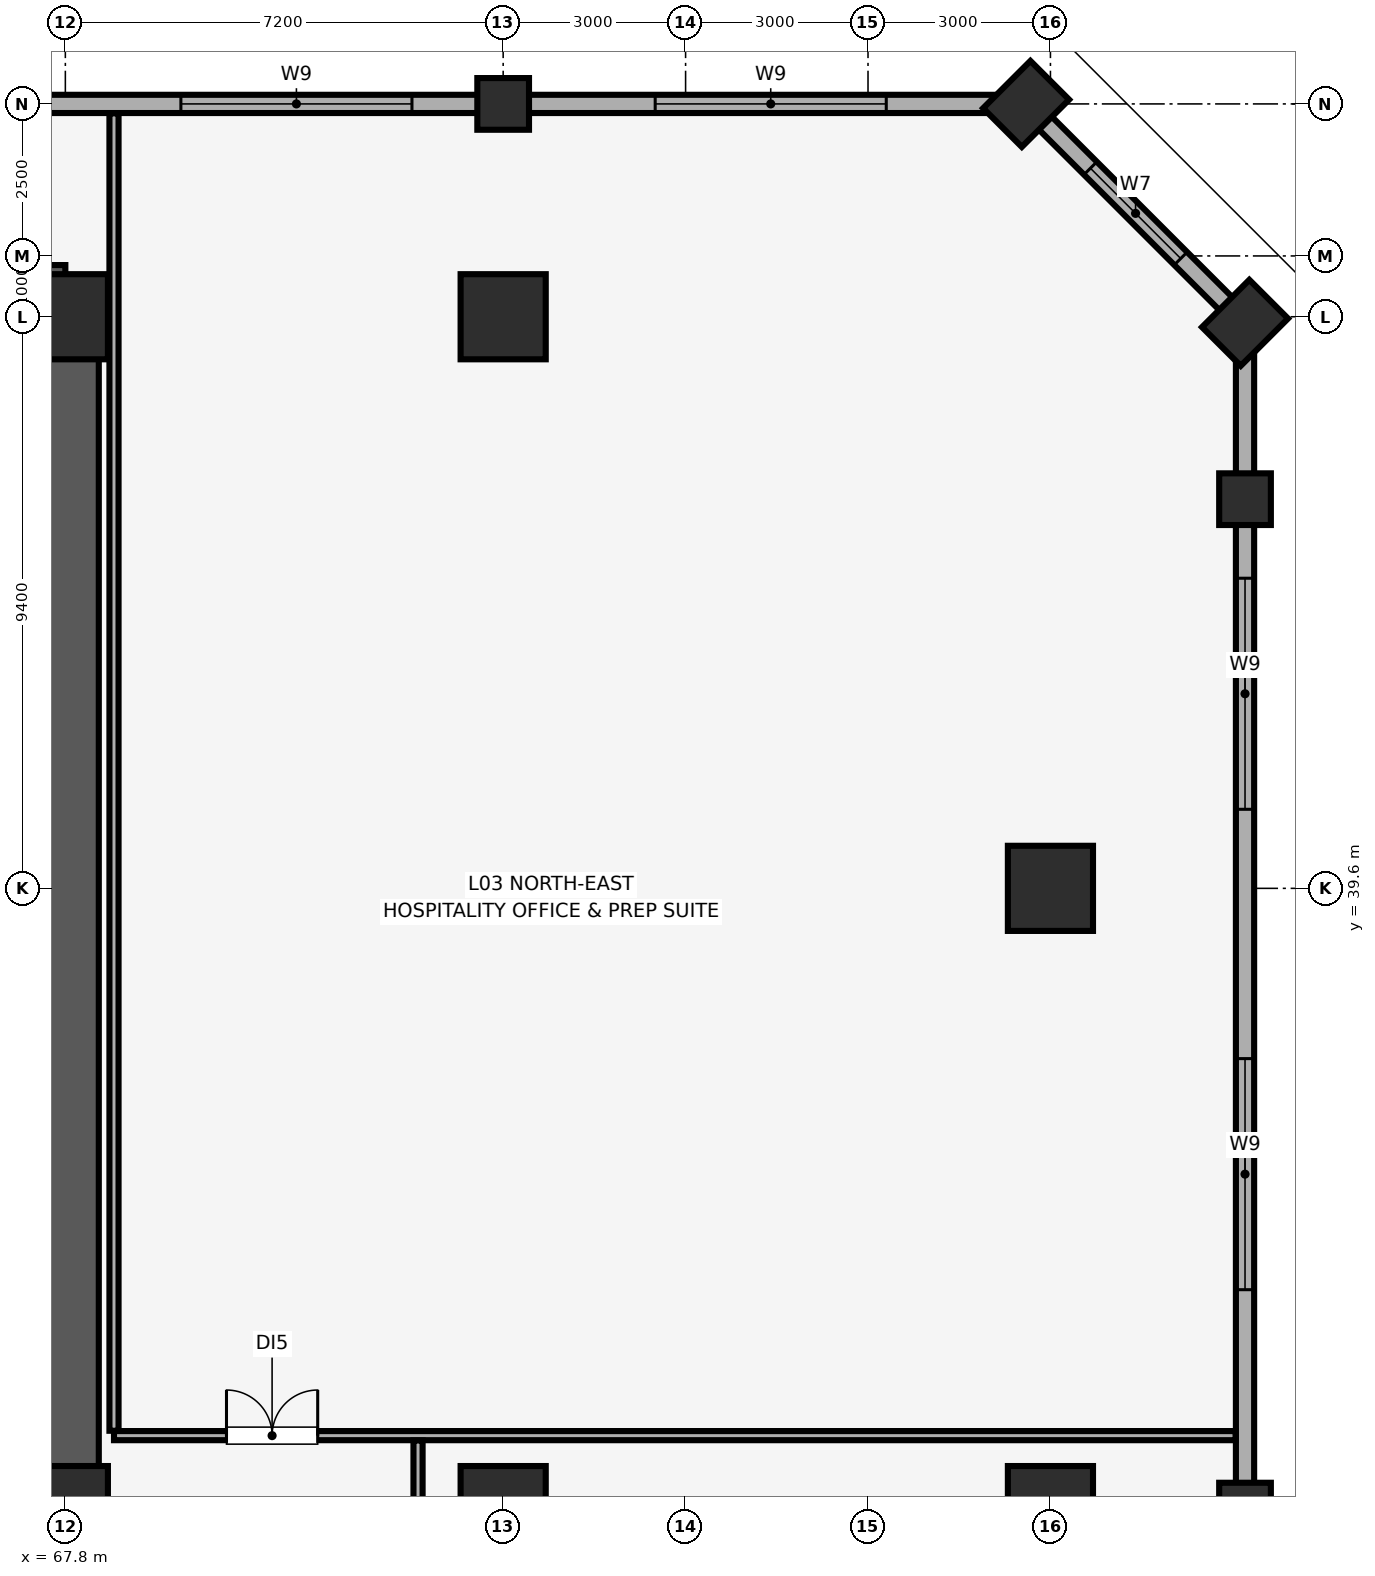
"""IFC4 building model, lengths in metres.
Left out: names, types, materials, properties, quantities, classifications, styles, units other than length and angle.
Written with IfcOpenShell. Run it as: python <this file> out.ifc"""

import sys

from ifc_helpers import new_model, si_unit, direction, frame, frame_2d, origin, origin_2d, place, context, subcontext, project, spatial, rectangle, extrude, element, fill, save


model = new_model("IFC4")
c1 = context("Model", 3, precision=1e-05, world=origin(), true_north=direction((0.0, 1.0)))
c2 = subcontext(c1, "Body", "Model", "MODEL_VIEW")
j1 = project(units=[si_unit("LENGTHUNIT", "METRE"), si_unit("PLANEANGLEUNIT", "RADIAN")], contexts=[c1])
p1 = place(None, origin())
s1 = spatial("IfcSite", under=j1, at=p1, CompositionType="ELEMENT")
p2 = place(p1, origin())
s2 = spatial("IfcBuilding", under=s1, at=p2, CompositionType="ELEMENT")
p3 = place(p2, frame((0.0, 0.0, 19.4)))
s3 = spatial("IfcBuildingStorey", under=s2, at=p3, CompositionType="ELEMENT", Elevation=19.4)
for number, where, z_axis, x_axis in (
    (1, (75.0, 52.5, 0.0), (0.0, 0.0, 1.0), (1.0, 0.0, 0.0)),
    (2, (87.2, 29.4, 0.0), (0.0, 0.0, 1.0), (1.0, 0.0, 0.0)),
    (3, (87.2, 46.0, 0.0), (0.0, 0.0, 1.0), (1.0, 0.0, 0.0)),
):
    element("IfcColumn", number, at=place(p3, frame(where, z_axis=z_axis, x_axis=x_axis)), inside=s3, PredefinedType="COLUMN", context=c2, shape_type="SweptSolid", body=[
        extrude(rectangle(XDim=0.85, YDim=0.85, at=origin_2d()), origin(), (0.0, 0.0, 1.0), 6.28),
    ])
for number, where, z_axis, x_axis in (
    (4, (87.2, 48.9, 0.0), (0.0, 0.0, 1.0), (0.707, 0.707, 0.0)),
    (5, (83.6, 52.5, 0.0), (0.0, 0.0, 1.0), (0.707, 0.707, 0.0)),
):
    element("IfcColumn", number, at=place(p3, frame(where, z_axis=z_axis, x_axis=x_axis)), inside=s3, PredefinedType="PILASTER", context=c2, shape_type="SweptSolid", body=[
        extrude(rectangle(XDim=1.1, YDim=0.9, at=origin_2d()), origin(), (0.0, 0.0, 1.0), 6.28),
    ])
for number, where, z_axis, x_axis in (
    (6, (67.8, 29.4, 0.0), (0.0, 0.0, 1.0), (1.0, 0.0, 0.0)),
    (7, (67.8, 49.0, 0.0), (0.0, 0.0, 1.0), (1.0, 0.0, 0.0)),
    (8, (75.0, 29.4, 0.0), (0.0, 0.0, 1.0), (1.0, 0.0, 0.0)),
    (9, (75.0, 49.0, 0.0), (0.0, 0.0, 1.0), (1.0, 0.0, 0.0)),
    (10, (84.0, 29.4, 0.0), (0.0, 0.0, 1.0), (1.0, 0.0, 0.0)),
    (11, (84.0, 39.6, 0.0), (0.0, 0.0, 1.0), (1.0, 0.0, 0.0)),
):
    element("IfcColumn", number, at=place(p3, frame(where, z_axis=z_axis, x_axis=x_axis)), inside=s3, PredefinedType="COLUMN", context=c2, shape_type="SweptSolid", body=[
        extrude(rectangle(XDim=1.4, YDim=1.4, at=origin_2d()), origin(), (0.0, 0.0, 1.0), 6.28),
    ])
p4 = place(p3, frame((87.2, 28.475, 0.0), z_axis=(0.0, 0.0, 1.0), x_axis=(0.0, 1.0, 0.0)))
e12 = element("IfcWall", 12, at=p4, inside=s3, PredefinedType="SOLIDWALL", context=c2, shape_type="SweptSolid", body=[
    extrude(rectangle(XDim=20.425, YDim=0.3, at=frame_2d((10.212, 0.0))), origin(), (0.0, 0.0, 1.0), 5.33),
])
p5 = place(p4, frame((4.525, 0.0, 0.85)))
e13 = element("IfcOpeningElement", 13, at=p5, cuts=e12, PredefinedType="OPENING", context=c2, shape_type="SweptSolid", body=[
    extrude(rectangle(XDim=3.8, YDim=2.2, at=frame_2d((1.9, 1.1))), frame((0.0, 0.16, 0.0), z_axis=(0.0, -1.0, 0.0), x_axis=(1.0, 0.0, 0.0)), (0.0, 0.0, 1.0), 0.32),
])
p6 = place(p4, frame((12.425, 0.0, 0.85)))
e14 = element("IfcOpeningElement", 14, at=p6, cuts=e12, PredefinedType="OPENING", context=c2, shape_type="SweptSolid", body=[
    extrude(rectangle(XDim=3.8, YDim=2.2, at=frame_2d((1.9, 1.1))), frame((0.0, 0.16, 0.0), z_axis=(0.0, -1.0, 0.0), x_axis=(1.0, 0.0, 0.0)), (0.0, 0.0, 1.0), 0.32),
])
p7 = place(p3, frame((87.2, 48.9, 0.0), z_axis=(0.0, 0.0, 1.0), x_axis=(-0.707082803744, 0.707130757816, 0.0)))
e15 = element("IfcWall", 15, at=p7, inside=s3, PredefinedType="SOLIDWALL", context=c2, shape_type="SweptSolid", body=[
    extrude(rectangle(XDim=5.091, YDim=0.3, at=frame_2d((2.545, 0.0))), origin(), (0.0, 0.0, 1.0), 5.33),
])
p8 = place(p7, frame((1.496, 0.0, 0.85)))
e16 = element("IfcOpeningElement", 16, at=p8, cuts=e15, PredefinedType="OPENING", context=c2, shape_type="SweptSolid", body=[
    extrude(rectangle(XDim=2.1, YDim=1.6, at=frame_2d((1.05, 0.8))), frame((0.0, 0.16, 0.0), z_axis=(0.0, -1.0, 0.0), x_axis=(1.0, 0.0, 0.0)), (0.0, 0.0, 1.0), 0.32),
])
p9 = place(p3, frame((83.6, 52.5, 0.0), z_axis=(0.0, 0.0, 1.0), x_axis=(-1.0, 0.0, 0.0)))
e17 = element("IfcWall", 17, at=p9, inside=s3, PredefinedType="SOLIDWALL", context=c2, shape_type="SweptSolid", body=[
    extrude(rectangle(XDim=83.2, YDim=0.3, at=frame_2d((41.6, 0.0))), origin(), (0.0, 0.0, 1.0), 5.33),
])
p10 = place(p9, frame((77.1, 0.0, 0.85)))
e18 = element("IfcOpeningElement", 18, at=p10, cuts=e17, PredefinedType="OPENING", context=c2, shape_type="SweptSolid", body=[
    extrude(rectangle(XDim=3.8, YDim=2.2, at=frame_2d((1.9, 1.1))), frame((0.0, 0.16, 0.0), z_axis=(0.0, -1.0, 0.0), x_axis=(1.0, 0.0, 0.0)), (0.0, 0.0, 1.0), 0.32),
])
p11 = place(p9, frame((69.15, 0.0, 0.85)))
e19 = element("IfcOpeningElement", 19, at=p11, cuts=e17, PredefinedType="OPENING", context=c2, shape_type="SweptSolid", body=[
    extrude(rectangle(XDim=3.8, YDim=2.2, at=frame_2d((1.9, 1.1))), frame((0.0, 0.16, 0.0), z_axis=(0.0, -1.0, 0.0), x_axis=(1.0, 0.0, 0.0)), (0.0, 0.0, 1.0), 0.32),
])
p12 = place(p9, frame((10.1, 0.0, 0.85)))
e20 = element("IfcOpeningElement", 20, at=p12, cuts=e17, PredefinedType="OPENING", context=c2, shape_type="SweptSolid", body=[
    extrude(rectangle(XDim=3.8, YDim=2.2, at=frame_2d((1.9, 1.1))), frame((0.0, 0.16, 0.0), z_axis=(0.0, -1.0, 0.0), x_axis=(1.0, 0.0, 0.0)), (0.0, 0.0, 1.0), 0.32),
])
p13 = place(p9, frame((2.3, 0.0, 0.85)))
e21 = element("IfcOpeningElement", 21, at=p13, cuts=e17, PredefinedType="OPENING", context=c2, shape_type="SweptSolid", body=[
    extrude(rectangle(XDim=3.8, YDim=2.2, at=frame_2d((1.9, 1.1))), frame((0.0, 0.16, 0.0), z_axis=(0.0, -1.0, 0.0), x_axis=(1.0, 0.0, 0.0)), (0.0, 0.0, 1.0), 0.32),
])
p14 = place(p3, frame((16.2, 49.3, 0.0), z_axis=(0.0, 0.0, 1.0), x_axis=(1.0, 0.0, 0.0)))
e22 = element("IfcWall", 22, at=p14, inside=s3, PredefinedType="SHEAR", context=c2, shape_type="SweptSolid", body=[
    extrude(rectangle(XDim=51.6, YDim=1.1, at=frame_2d((25.8, 0.0))), origin(), (0.0, 0.0, 1.0), 6.28),
])
p15 = place(p3, frame((67.8, 29.4, 0.0), z_axis=(0.0, 0.0, 1.0), x_axis=(0.0, 1.0, 0.0)))
e23 = element("IfcWall", 23, at=p15, inside=s3, PredefinedType="SHEAR", context=c2, shape_type="SweptSolid", body=[
    extrude(rectangle(XDim=19.2, YDim=1.1, at=frame_2d((9.6, 0.0))), origin(), (0.0, 0.0, 1.0), 6.28),
])
p16 = place(p3, frame((68.6, 30.6, 0.0), z_axis=(0.0, 0.0, 1.0), x_axis=(1.0, 0.0, 0.0)))
e24 = element("IfcWall", 24, at=p16, inside=s3, PredefinedType="PARTITIONING", context=c2, shape_type="SweptSolid", body=[
    extrude(rectangle(XDim=18.445, YDim=0.15, at=frame_2d((9.222, 0.0))), origin(), (0.0, 0.0, 1.0), 6.28),
])
p17 = place(p16, frame((1.85, 0.0, 0.0)))
e25 = element("IfcOpeningElement", 25, at=p17, cuts=e24, PredefinedType="OPENING", context=c2, shape_type="SweptSolid", body=[
    extrude(rectangle(XDim=1.5, YDim=2.25, at=frame_2d((0.75, 1.125))), frame((0.0, 0.085, 0.0), z_axis=(0.0, -1.0, 0.0), x_axis=(1.0, 0.0, 0.0)), (0.0, 0.0, 1.0), 0.17),
])
p18 = place(p3, frame((68.6, 30.68, 0.0), z_axis=(0.0, 0.0, 1.0), x_axis=(0.0, 1.0, 0.0)))
e26 = element("IfcWall", 26, at=p18, inside=s3, PredefinedType="PARTITIONING", context=c2, shape_type="SweptSolid", body=[
    extrude(rectangle(XDim=21.665, YDim=0.15, at=frame_2d((10.833, 0.0))), origin(), (0.0, 0.0, 1.0), 6.28),
])
p19 = place(p3, frame((73.6, 25.48, 0.0), z_axis=(0.0, 0.0, 1.0), x_axis=(0.0, 1.0, 0.0)))
e27 = element("IfcWall", 27, at=p19, inside=s3, PredefinedType="PARTITIONING", context=c2, shape_type="SweptSolid", body=[
    extrude(rectangle(XDim=5.04, YDim=0.15, at=frame_2d((2.52, 0.0))), origin(), (0.0, 0.0, 1.0), 6.28),
])
p20 = place(p8, origin())
e28 = element("IfcWindow", 28, at=p20, inside=s3, PartitioningType="SINGLE_PANEL", PredefinedType="WINDOW", context=c2, shape_type="SweptSolid", body=[
    extrude(rectangle(XDim=2.1, YDim=1.6, at=frame_2d((1.05, 0.8))), frame((0.0, 0.03, 0.0), z_axis=(0.0, -1.0, 0.0), x_axis=(1.0, 0.0, 0.0)), (0.0, 0.0, 1.0), 0.06),
])
fill(e16, e28)
p21 = place(p5, origin())
e29 = element("IfcWindow", 29, at=p21, inside=s3, PartitioningType="SINGLE_PANEL", PredefinedType="WINDOW", context=c2, shape_type="SweptSolid", body=[
    extrude(rectangle(XDim=3.8, YDim=2.2, at=frame_2d((1.9, 1.1))), frame((0.0, 0.03, 0.0), z_axis=(0.0, -1.0, 0.0), x_axis=(1.0, 0.0, 0.0)), (0.0, 0.0, 1.0), 0.06),
])
fill(e13, e29)
p22 = place(p6, origin())
e30 = element("IfcWindow", 30, at=p22, inside=s3, PartitioningType="SINGLE_PANEL", PredefinedType="WINDOW", context=c2, shape_type="SweptSolid", body=[
    extrude(rectangle(XDim=3.8, YDim=2.2, at=frame_2d((1.9, 1.1))), frame((0.0, 0.03, 0.0), z_axis=(0.0, -1.0, 0.0), x_axis=(1.0, 0.0, 0.0)), (0.0, 0.0, 1.0), 0.06),
])
fill(e14, e30)
p23 = place(p12, origin())
e31 = element("IfcWindow", 31, at=p23, inside=s3, PartitioningType="SINGLE_PANEL", PredefinedType="WINDOW", context=c2, shape_type="SweptSolid", body=[
    extrude(rectangle(XDim=3.8, YDim=2.2, at=frame_2d((1.9, 1.1))), frame((0.0, 0.03, 0.0), z_axis=(0.0, -1.0, 0.0), x_axis=(1.0, 0.0, 0.0)), (0.0, 0.0, 1.0), 0.06),
])
fill(e20, e31)
p24 = place(p13, origin())
e32 = element("IfcWindow", 32, at=p24, inside=s3, PartitioningType="SINGLE_PANEL", PredefinedType="WINDOW", context=c2, shape_type="SweptSolid", body=[
    extrude(rectangle(XDim=3.8, YDim=2.2, at=frame_2d((1.9, 1.1))), frame((0.0, 0.03, 0.0), z_axis=(0.0, -1.0, 0.0), x_axis=(1.0, 0.0, 0.0)), (0.0, 0.0, 1.0), 0.06),
])
fill(e21, e32)
p25 = place(p17, origin())
e33 = element("IfcDoor", 33, at=p25, inside=s3, OperationType="DOUBLE_DOOR_SINGLE_SWING", PredefinedType="DOOR", context=c2, shape_type="SweptSolid", body=[
    extrude(rectangle(XDim=1.5, YDim=2.25, at=frame_2d((0.75, 1.125))), frame((0.0, 0.025, 0.0), z_axis=(0.0, -1.0, 0.0), x_axis=(1.0, 0.0, 0.0)), (0.0, 0.0, 1.0), 0.05),
])
fill(e25, e33)
save(model, sys.argv[1])
